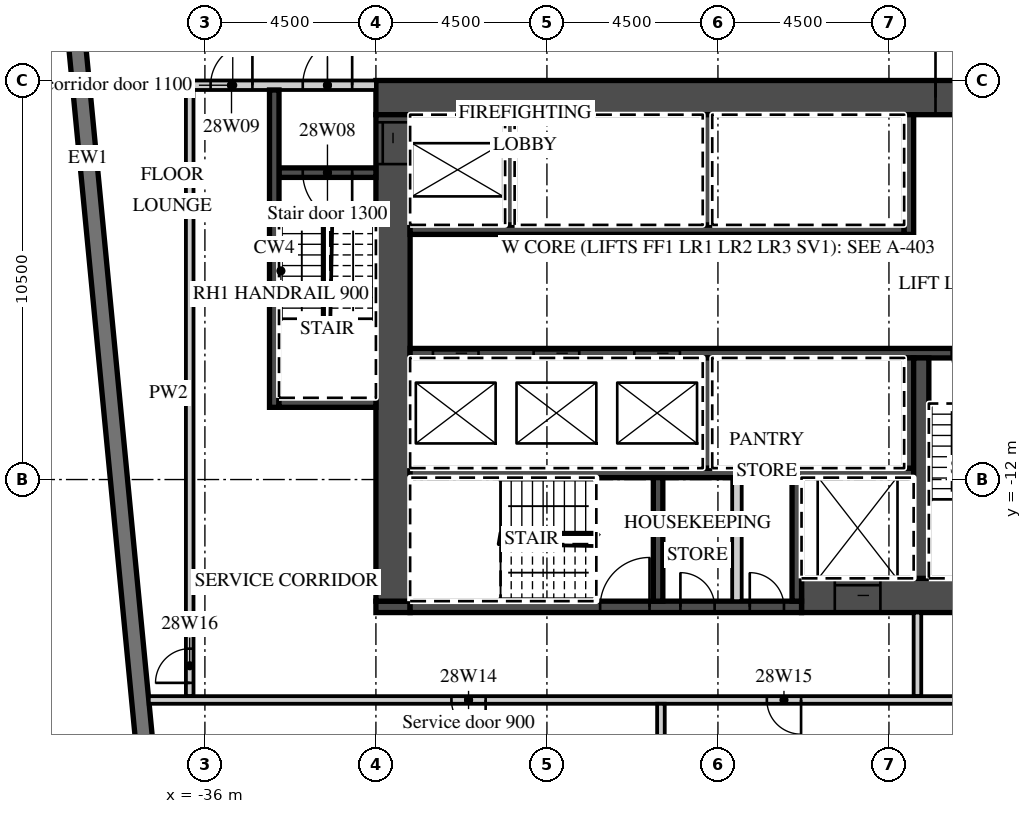
"""IFC4 building model, lengths in metres.
Left out: names, types, materials, properties, quantities, classifications, styles, units other than length and angle.
Written with IfcOpenShell. Run it as: python <this file> out.ifc"""

import sys

from ifc_helpers import new_model, si_unit, direction, frame, frame_2d, origin, place, context, subcontext, project, spatial, rectangle, extrude, element, fill, save


model = new_model("IFC4")
c1 = context("Model", 3, precision=1e-05, world=origin(), true_north=direction((0.0, 1.0)))
c2 = subcontext(c1, "Body", "Model", "MODEL_VIEW")
j1 = project(units=[si_unit("LENGTHUNIT", "METRE"), si_unit("PLANEANGLEUNIT", "RADIAN")], contexts=[c1])
p1 = place(None, origin())
s1 = spatial("IfcSite", under=j1, at=p1, CompositionType="ELEMENT")
p2 = place(p1, origin())
s2 = spatial("IfcBuilding", under=s1, at=p2, CompositionType="ELEMENT")
p3 = place(p2, frame((0.0, 0.0, 127.3)))
s3 = spatial("IfcBuildingStorey", under=s2, at=p3, CompositionType="ELEMENT", Elevation=127.3)
p4 = place(p3, frame((-40.753, 13.872, 0.0), z_axis=(0.0, 0.0, 1.0), x_axis=(0.095843327381, -0.995396431878, 0.0)))
e1 = element("IfcWall", 1, at=p4, inside=s3, PredefinedType="SOLIDWALL", context=c2, shape_type="SweptSolid", body=[
    extrude(rectangle(XDim=35.0, YDim=0.45, at=frame_2d((17.5, 0.0))), origin(), (0.0, 0.0, 1.0), 3.02),
])
p5 = place(p4, frame((4.277, 0.0, 0.45)))
e2 = element("IfcOpeningElement", 2, at=p5, cuts=e1, PredefinedType="OPENING", context=c2, shape_type="SweptSolid", body=[
    extrude(rectangle(XDim=3.3, YDim=2.25, at=frame_2d((1.65, 1.125))), frame((0.0, 0.235, 0.0), z_axis=(0.0, -1.0, 0.0), x_axis=(1.0, 0.0, 0.0)), (0.0, 0.0, 1.0), 0.47),
])
p6 = place(p4, frame((8.798, 0.0, 0.45)))
e3 = element("IfcOpeningElement", 3, at=p6, cuts=e1, PredefinedType="OPENING", context=c2, shape_type="SweptSolid", body=[
    extrude(rectangle(XDim=3.3, YDim=2.25, at=frame_2d((1.65, 1.125))), frame((0.0, 0.235, 0.0), z_axis=(0.0, -1.0, 0.0), x_axis=(1.0, 0.0, 0.0)), (0.0, 0.0, 1.0), 0.47),
])
p7 = place(p3, frame((-31.5, -1.95, 0.0), z_axis=(0.0, 0.0, 1.0), x_axis=(1.0, 0.0, 0.0)))
e4 = element("IfcWall", 4, at=p7, inside=s3, PredefinedType="SHEAR", context=c2, shape_type="SweptSolid", body=[
    extrude(rectangle(XDim=18.0, YDim=0.9, at=frame_2d((9.0, 0.0))), origin(), (0.0, 0.0, 1.0), 3.02),
])
p8 = place(p7, frame((14.725, 0.0, 0.0)))
e5 = element("IfcOpeningElement", 5, at=p8, cuts=e4, PredefinedType="OPENING", context=c2, shape_type="SweptSolid", body=[
    extrude(rectangle(XDim=1.8, YDim=2.1, at=frame_2d((0.9, 1.05))), frame((0.0, 0.46, 0.0), z_axis=(0.0, -1.0, 0.0), x_axis=(1.0, 0.0, 0.0)), (0.0, 0.0, 1.0), 0.92),
])
p9 = place(p3, frame((-20.3, -15.05, 0.0), z_axis=(0.0, 0.0, 1.0), x_axis=(1.0, 0.0, 0.0)))
e6 = element("IfcWall", 6, at=p9, inside=s3, PredefinedType="SHEAR", context=c2, shape_type="SweptSolid", body=[
    extrude(rectangle(XDim=6.8, YDim=0.9, at=frame_2d((3.4, 0.0))), origin(), (0.0, 0.0, 1.0), 3.02),
])
p10 = place(p9, frame((0.875, 0.0, 0.0)))
e7 = element("IfcOpeningElement", 7, at=p10, cuts=e6, PredefinedType="OPENING", context=c2, shape_type="SweptSolid", body=[
    extrude(rectangle(XDim=1.2, YDim=2.1, at=frame_2d((0.6, 1.05))), frame((0.0, 0.46, 0.0), z_axis=(0.0, -1.0, 0.0), x_axis=(1.0, 0.0, 0.0)), (0.0, 0.0, 1.0), 0.92),
])
p11 = place(p3, frame((-31.5, -15.35, 0.0), z_axis=(0.0, 0.0, 1.0), x_axis=(1.0, 0.0, 0.0)))
e8 = element("IfcWall", 8, at=p11, inside=s3, PredefinedType="SHEAR", context=c2, shape_type="SweptSolid", body=[
    extrude(rectangle(XDim=0.9, YDim=0.3, at=frame_2d((0.45, 0.0))), origin(), (0.0, 0.0, 1.0), 3.02),
])
p12 = place(p3, frame((-30.6, -15.35, 0.0), z_axis=(0.0, 0.0, 1.0), x_axis=(1.0, 0.0, 0.0)))
e9 = element("IfcWall", 9, at=p12, inside=s3, PredefinedType="SHEAR", context=c2, shape_type="SweptSolid", body=[
    extrude(rectangle(XDim=10.3, YDim=0.3, at=frame_2d((5.15, 0.0))), origin(), (0.0, 0.0, 1.0), 3.02),
])
p13 = place(p12, frame((5.0, 0.0, 0.0)))
e10 = element("IfcOpeningElement", 10, at=p13, cuts=e9, PredefinedType="OPENING", context=c2, shape_type="SweptSolid", body=[
    extrude(rectangle(XDim=1.3, YDim=2.1, at=frame_2d((0.65, 1.05))), frame((0.0, 0.16, 0.0), z_axis=(0.0, -1.0, 0.0), x_axis=(1.0, 0.0, 0.0)), (0.0, 0.0, 1.0), 0.32),
])
p14 = place(p12, frame((7.113, 0.0, 0.0)))
e11 = element("IfcOpeningElement", 11, at=p14, cuts=e9, PredefinedType="OPENING", context=c2, shape_type="SweptSolid", body=[
    extrude(rectangle(XDim=0.9, YDim=2.1, at=frame_2d((0.45, 1.05))), frame((0.0, 0.16, 0.0), z_axis=(0.0, -1.0, 0.0), x_axis=(1.0, 0.0, 0.0)), (0.0, 0.0, 1.0), 0.32),
])
p15 = place(p12, frame((8.938, 0.0, 0.0)))
e12 = element("IfcOpeningElement", 12, at=p15, cuts=e9, PredefinedType="OPENING", context=c2, shape_type="SweptSolid", body=[
    extrude(rectangle(XDim=0.9, YDim=2.1, at=frame_2d((0.45, 1.05))), frame((0.0, 0.16, 0.0), z_axis=(0.0, -1.0, 0.0), x_axis=(1.0, 0.0, 0.0)), (0.0, 0.0, 1.0), 0.32),
])
p16 = place(p3, frame((-31.05, -15.2, 0.0), z_axis=(0.0, 0.0, 1.0), x_axis=(0.0, 1.0, 0.0)))
e13 = element("IfcWall", 13, at=p16, inside=s3, PredefinedType="SHEAR", context=c2, shape_type="SweptSolid", body=[
    extrude(rectangle(XDim=12.8, YDim=0.9, at=frame_2d((6.4, 0.0))), origin(), (0.0, 0.0, 1.0), 3.02),
])
p17 = place(p16, frame((11.5, 0.0, 0.0)))
e14 = element("IfcOpeningElement", 14, at=p17, cuts=e13, PredefinedType="OPENING", context=c2, shape_type="SweptSolid", body=[
    extrude(rectangle(XDim=1.1, YDim=2.1, at=frame_2d((0.55, 1.05))), frame((0.0, 0.46, 0.0), z_axis=(0.0, -1.0, 0.0), x_axis=(1.0, 0.0, 0.0)), (0.0, 0.0, 1.0), 0.92),
])
p18 = place(p3, frame((-30.6, -5.425, 0.0), z_axis=(0.0, 0.0, 1.0), x_axis=(1.0, 0.0, 0.0)))
e15 = element("IfcWall", 15, at=p18, inside=s3, PredefinedType="SHEAR", context=c2, shape_type="SweptSolid", body=[
    extrude(rectangle(XDim=13.0, YDim=0.25, at=frame_2d((6.5, 0.0))), origin(), (0.0, 0.0, 1.0), 3.02),
])
p19 = place(p3, frame((-17.475, -5.55, 0.0), z_axis=(0.0, 0.0, 1.0), x_axis=(0.0, 1.0, 0.0)))
e16 = element("IfcWall", 16, at=p19, inside=s3, PredefinedType="SHEAR", context=c2, shape_type="SweptSolid", body=[
    extrude(rectangle(XDim=3.15, YDim=0.25, at=frame_2d((1.575, 0.0))), origin(), (0.0, 0.0, 1.0), 3.02),
])
for number, where, z_axis, x_axis in (
    (17, (-27.975, -5.3, 0.0), (0.0, 0.0, 1.0), (0.0, 1.0, 0.0)),
    (18, (-22.775, -5.3, 0.0), (0.0, 0.0, 1.0), (0.0, 1.0, 0.0)),
):
    element("IfcWall", number, at=place(p3, frame(where, z_axis=z_axis, x_axis=x_axis)), inside=s3, PredefinedType="SHEAR", context=c2, shape_type="SweptSolid", body=[
        extrude(rectangle(XDim=2.9, YDim=0.25, at=frame_2d((1.45, 0.0))), origin(), (0.0, 0.0, 1.0), 3.02),
    ])
p20 = place(p3, frame((-30.6, -8.675, 0.0), z_axis=(0.0, 0.0, 1.0), x_axis=(1.0, 0.0, 0.0)))
e19 = element("IfcWall", 19, at=p20, inside=s3, PredefinedType="SHEAR", context=c2, shape_type="SweptSolid", body=[
    extrude(rectangle(XDim=16.2, YDim=0.25, at=frame_2d((8.1, 0.0))), origin(), (0.0, 0.0, 1.0), 3.02),
])
p21 = place(p20, frame((0.6, 0.0, 0.0)))
e20 = element("IfcOpeningElement", 20, at=p21, cuts=e19, PredefinedType="OPENING", context=c2, shape_type="SweptSolid", body=[
    extrude(rectangle(XDim=1.2, YDim=2.1, at=frame_2d((0.6, 1.05))), frame((0.0, 0.135, 0.0), z_axis=(0.0, -1.0, 0.0), x_axis=(1.0, 0.0, 0.0)), (0.0, 0.0, 1.0), 0.27),
])
p22 = place(p20, frame((3.25, 0.0, 0.0)))
e21 = element("IfcOpeningElement", 21, at=p22, cuts=e19, PredefinedType="OPENING", context=c2, shape_type="SweptSolid", body=[
    extrude(rectangle(XDim=1.2, YDim=2.1, at=frame_2d((0.6, 1.05))), frame((0.0, 0.135, 0.0), z_axis=(0.0, -1.0, 0.0), x_axis=(1.0, 0.0, 0.0)), (0.0, 0.0, 1.0), 0.27),
])
p23 = place(p20, frame((5.9, 0.0, 0.0)))
e22 = element("IfcOpeningElement", 22, at=p23, cuts=e19, PredefinedType="OPENING", context=c2, shape_type="SweptSolid", body=[
    extrude(rectangle(XDim=1.2, YDim=2.1, at=frame_2d((0.6, 1.05))), frame((0.0, 0.135, 0.0), z_axis=(0.0, -1.0, 0.0), x_axis=(1.0, 0.0, 0.0)), (0.0, 0.0, 1.0), 0.27),
])
p24 = place(p20, frame((14.25, 0.0, 0.0)))
e23 = element("IfcOpeningElement", 23, at=p24, cuts=e19, PredefinedType="OPENING", context=c2, shape_type="SweptSolid", body=[
    extrude(rectangle(XDim=1.3, YDim=2.1, at=frame_2d((0.65, 1.05))), frame((0.0, 0.135, 0.0), z_axis=(0.0, -1.0, 0.0), x_axis=(1.0, 0.0, 0.0)), (0.0, 0.0, 1.0), 0.27),
])
p25 = place(p3, frame((-30.6, -11.825, 0.0), z_axis=(0.0, 0.0, 1.0), x_axis=(1.0, 0.0, 0.0)))
e24 = element("IfcWall", 24, at=p25, inside=s3, PredefinedType="SHEAR", context=c2, shape_type="SweptSolid", body=[
    extrude(rectangle(XDim=13.25, YDim=0.25, at=frame_2d((6.625, 0.0))), origin(), (0.0, 0.0, 1.0), 3.02),
])
for number, where, z_axis, x_axis in (
    (25, (-17.475, -11.7, 0.0), (0.0, 0.0, 1.0), (0.0, 1.0, 0.0)),
    (26, (-22.775, -11.7, 0.0), (0.0, 0.0, 1.0), (0.0, 1.0, 0.0)),
):
    element("IfcWall", number, at=place(p3, frame(where, z_axis=z_axis, x_axis=x_axis)), inside=s3, PredefinedType="SHEAR", context=c2, shape_type="SweptSolid", body=[
        extrude(rectangle(XDim=2.9, YDim=0.25, at=frame_2d((1.45, 0.0))), origin(), (0.0, 0.0, 1.0), 3.02),
    ])
p26 = place(p3, frame((-17.15, -14.6, 0.0), z_axis=(0.0, 0.0, 1.0), x_axis=(0.0, 1.0, 0.0)))
e27 = element("IfcWall", 27, at=p26, inside=s3, PredefinedType="SHEAR", context=c2, shape_type="SweptSolid", body=[
    extrude(rectangle(XDim=5.8, YDim=0.4, at=frame_2d((2.9, 0.0))), origin(), (0.0, 0.0, 1.0), 3.02),
])
for number, where, z_axis, x_axis in (
    (28, (-20.425, -15.2, 0.0), (0.0, 0.0, 1.0), (0.0, 1.0, 0.0)),
    (29, (-24.075, -15.2, 0.0), (0.0, 0.0, 1.0), (0.0, 1.0, 0.0)),
):
    element("IfcWall", number, at=place(p3, frame(where, z_axis=z_axis, x_axis=x_axis)), inside=s3, PredefinedType="SHEAR", context=c2, shape_type="SweptSolid", body=[
        extrude(rectangle(XDim=3.25, YDim=0.25, at=frame_2d((1.625, 0.0))), origin(), (0.0, 0.0, 1.0), 3.02),
    ])
p27 = place(p3, frame((-22.0, -15.2, 0.0), z_axis=(0.0, 0.0, 1.0), x_axis=(0.0, 1.0, 0.0)))
e30 = element("IfcWall", 30, at=p27, inside=s3, PredefinedType="PARTITIONING", context=c2, shape_type="SweptSolid", body=[
    extrude(rectangle(XDim=3.25, YDim=0.25, at=frame_2d((1.625, 0.0))), origin(), (0.0, 0.0, 1.0), 3.02),
])
p28 = place(p3, frame((-39.035, -1.625, 0.0), z_axis=(0.0, 0.0, 1.0), x_axis=(1.0, 0.0, 0.0)))
e31 = element("IfcWall", 31, at=p28, inside=s3, PredefinedType="PARTITIONING", context=c2, shape_type="SweptSolid", body=[
    extrude(rectangle(XDim=7.535, YDim=0.25, at=frame_2d((3.768, 0.0))), origin(), (0.0, 0.0, 1.0), 3.02),
])
p29 = place(p28, frame((5.61, 0.0, 0.0)))
e32 = element("IfcOpeningElement", 32, at=p29, cuts=e31, PredefinedType="OPENING", context=c2, shape_type="SweptSolid", body=[
    extrude(rectangle(XDim=1.3, YDim=2.1, at=frame_2d((0.65, 1.05))), frame((0.0, 0.135, 0.0), z_axis=(0.0, -1.0, 0.0), x_axis=(1.0, 0.0, 0.0)), (0.0, 0.0, 1.0), 0.27),
])
p30 = place(p28, frame((3.185, 0.0, 0.0)))
e33 = element("IfcOpeningElement", 33, at=p30, cuts=e31, PredefinedType="OPENING", context=c2, shape_type="SweptSolid", body=[
    extrude(rectangle(XDim=1.1, YDim=2.1, at=frame_2d((0.55, 1.05))), frame((0.0, 0.135, 0.0), z_axis=(0.0, -1.0, 0.0), x_axis=(1.0, 0.0, 0.0)), (0.0, 0.0, 1.0), 0.27),
])
p31 = place(p3, frame((-34.05, -3.925, 0.0), z_axis=(0.0, 0.0, 1.0), x_axis=(1.0, 0.0, 0.0)))
e34 = element("IfcWall", 34, at=p31, inside=s3, PredefinedType="SHEAR", context=c2, shape_type="SweptSolid", body=[
    extrude(rectangle(XDim=2.55, YDim=0.25, at=frame_2d((1.275, 0.0))), origin(), (0.0, 0.0, 1.0), 3.02),
])
p32 = place(p31, frame((0.625, 0.0, 0.0)))
e35 = element("IfcOpeningElement", 35, at=p32, cuts=e34, PredefinedType="OPENING", context=c2, shape_type="SweptSolid", body=[
    extrude(rectangle(XDim=1.3, YDim=2.1, at=frame_2d((0.65, 1.05))), frame((0.0, 0.135, 0.0), z_axis=(0.0, -1.0, 0.0), x_axis=(1.0, 0.0, 0.0)), (0.0, 0.0, 1.0), 0.27),
])
p33 = place(p3, frame((-34.175, -10.1, 0.0), z_axis=(0.0, 0.0, 1.0), x_axis=(0.0, 1.0, 0.0)))
e36 = element("IfcWall", 36, at=p33, inside=s3, PredefinedType="SHEAR", context=c2, shape_type="SweptSolid", body=[
    extrude(rectangle(XDim=8.35, YDim=0.25, at=frame_2d((4.175, 0.0))), origin(), (0.0, 0.0, 1.0), 3.02),
])
p34 = place(p3, frame((-34.05, -9.975, 0.0), z_axis=(0.0, 0.0, 1.0), x_axis=(1.0, 0.0, 0.0)))
e37 = element("IfcWall", 37, at=p34, inside=s3, PredefinedType="SHEAR", context=c2, shape_type="SweptSolid", body=[
    extrude(rectangle(XDim=2.55, YDim=0.25, at=frame_2d((1.275, 0.0))), origin(), (0.0, 0.0, 1.0), 3.02),
])
p35 = place(p3, frame((-17.25, -17.7, 0.0), z_axis=(0.0, 0.0, 1.0), x_axis=(0.0, 1.0, 0.0)))
e38 = element("IfcWall", 38, at=p35, inside=s3, PredefinedType="PARTITIONING", context=c2, shape_type="SweptSolid", body=[
    extrude(rectangle(XDim=2.2, YDim=0.2, at=frame_2d((1.1, 0.0))), origin(), (0.0, 0.0, 1.0), 3.02),
])
p36 = place(p3, frame((-36.4, -17.7, 0.0), z_axis=(0.0, 0.0, 1.0), x_axis=(0.0, 1.0, 0.0)))
e39 = element("IfcWall", 39, at=p36, inside=s3, PredefinedType="PARTITIONING", context=c2, shape_type="SweptSolid", body=[
    extrude(rectangle(XDim=15.95, YDim=0.2, at=frame_2d((7.975, 0.0))), origin(), (0.0, 0.0, 1.0), 3.02),
])
p37 = place(p36, frame((0.35, 0.0, 0.0)))
e40 = element("IfcOpeningElement", 40, at=p37, cuts=e39, PredefinedType="OPENING", context=c2, shape_type="SweptSolid", body=[
    extrude(rectangle(XDim=0.9, YDim=2.1, at=frame_2d((0.45, 1.05))), frame((0.0, 0.11, 0.0), z_axis=(0.0, -1.0, 0.0), x_axis=(1.0, 0.0, 0.0)), (0.0, 0.0, 1.0), 0.22),
])
p38 = place(p3, frame((-37.477, -17.8, 0.0), z_axis=(0.0, 0.0, 1.0), x_axis=(1.0, 0.0, 0.0)))
e41 = element("IfcWall", 41, at=p38, inside=s3, PredefinedType="PARTITIONING", context=c2, shape_type="SweptSolid", body=[
    extrude(rectangle(XDim=23.877, YDim=0.2, at=frame_2d((11.938, 0.0))), origin(), (0.0, 0.0, 1.0), 3.02),
])
p39 = place(p38, frame((7.965, 0.0, 0.0)))
e42 = element("IfcOpeningElement", 42, at=p39, cuts=e41, PredefinedType="OPENING", context=c2, shape_type="SweptSolid", body=[
    extrude(rectangle(XDim=0.9, YDim=2.1, at=frame_2d((0.45, 1.05))), frame((0.0, 0.11, 0.0), z_axis=(0.0, -1.0, 0.0), x_axis=(1.0, 0.0, 0.0)), (0.0, 0.0, 1.0), 0.22),
])
p40 = place(p38, frame((16.265, 0.0, 0.0)))
e43 = element("IfcOpeningElement", 43, at=p40, cuts=e41, PredefinedType="OPENING", context=c2, shape_type="SweptSolid", body=[
    extrude(rectangle(XDim=0.9, YDim=2.1, at=frame_2d((0.45, 1.05))), frame((0.0, 0.11, 0.0), z_axis=(0.0, -1.0, 0.0), x_axis=(1.0, 0.0, 0.0)), (0.0, 0.0, 1.0), 0.22),
])
p41 = place(p3, frame((-24.0, -23.244, 0.0), z_axis=(0.0, 0.0, 1.0), x_axis=(0.0, 1.0, 0.0)))
e44 = element("IfcWall", 44, at=p41, inside=s3, PredefinedType="PARTITIONING", context=c2, shape_type="SweptSolid", body=[
    extrude(rectangle(XDim=5.344, YDim=0.2, at=frame_2d((2.672, 0.0))), origin(), (0.0, 0.0, 1.0), 3.02),
])
p42 = place(p21, origin())
e45 = element("IfcDoor", 45, at=p42, inside=s3, OperationType="SLIDING_TO_LEFT", PredefinedType="DOOR", context=c2, shape_type="SweptSolid", body=[
    extrude(rectangle(XDim=1.2, YDim=2.1, at=frame_2d((0.6, 1.05))), frame((0.0, 0.025, 0.0), z_axis=(0.0, -1.0, 0.0), x_axis=(1.0, 0.0, 0.0)), (0.0, 0.0, 1.0), 0.05),
])
fill(e20, e45)
p43 = place(p22, origin())
e46 = element("IfcDoor", 46, at=p43, inside=s3, OperationType="SLIDING_TO_RIGHT", PredefinedType="DOOR", context=c2, shape_type="SweptSolid", body=[
    extrude(rectangle(XDim=1.2, YDim=2.1, at=frame_2d((0.6, 1.05))), frame((0.0, 0.025, 0.0), z_axis=(0.0, -1.0, 0.0), x_axis=(1.0, 0.0, 0.0)), (0.0, 0.0, 1.0), 0.05),
])
fill(e21, e46)
p44 = place(p23, origin())
e47 = element("IfcDoor", 47, at=p44, inside=s3, OperationType="SLIDING_TO_RIGHT", PredefinedType="DOOR", context=c2, shape_type="SweptSolid", body=[
    extrude(rectangle(XDim=1.2, YDim=2.1, at=frame_2d((0.6, 1.05))), frame((0.0, 0.025, 0.0), z_axis=(0.0, -1.0, 0.0), x_axis=(1.0, 0.0, 0.0)), (0.0, 0.0, 1.0), 0.05),
])
fill(e22, e47)
p45 = place(p10, origin())
e48 = element("IfcDoor", 48, at=p45, inside=s3, OperationType="SLIDING_TO_LEFT", PredefinedType="DOOR", context=c2, shape_type="SweptSolid", body=[
    extrude(rectangle(XDim=1.2, YDim=2.1, at=frame_2d((0.6, 1.05))), frame((0.0, 0.025, 0.0), z_axis=(0.0, -1.0, 0.0), x_axis=(1.0, 0.0, 0.0)), (0.0, 0.0, 1.0), 0.05),
])
fill(e7, e48)
p46 = place(p17, origin())
e49 = element("IfcDoor", 49, at=p46, inside=s3, OperationType="SLIDING_TO_RIGHT", PredefinedType="DOOR", context=c2, shape_type="SweptSolid", body=[
    extrude(rectangle(XDim=1.1, YDim=2.1, at=frame_2d((0.55, 1.05))), frame((0.0, 0.025, 0.0), z_axis=(0.0, -1.0, 0.0), x_axis=(1.0, 0.0, 0.0)), (0.0, 0.0, 1.0), 0.05),
])
fill(e14, e49)
p47 = place(p8, origin())
e50 = element("IfcDoor", 50, at=p47, inside=s3, OperationType="DOUBLE_DOOR_DOUBLE_SWING", PredefinedType="DOOR", context=c2, shape_type="SweptSolid", body=[
    extrude(rectangle(XDim=1.8, YDim=2.1, at=frame_2d((0.9, 1.05))), frame((0.0, 0.025, 0.0), z_axis=(0.0, -1.0, 0.0), x_axis=(1.0, 0.0, 0.0)), (0.0, 0.0, 1.0), 0.05),
])
fill(e5, e50)
p48 = place(p29, origin())
e51 = element("IfcDoor", 51, at=p48, inside=s3, OperationType="SINGLE_SWING_RIGHT", PredefinedType="DOOR", context=c2, shape_type="SweptSolid", body=[
    extrude(rectangle(XDim=1.3, YDim=2.1, at=frame_2d((0.65, 1.05))), frame((0.0, 0.025, 0.0), z_axis=(0.0, -1.0, 0.0), x_axis=(1.0, 0.0, 0.0)), (0.0, 0.0, 1.0), 0.05),
])
fill(e32, e51)
p49 = place(p32, origin())
e52 = element("IfcDoor", 52, at=p49, inside=s3, OperationType="SINGLE_SWING_RIGHT", PredefinedType="DOOR", context=c2, shape_type="SweptSolid", body=[
    extrude(rectangle(XDim=1.3, YDim=2.1, at=frame_2d((0.65, 1.05))), frame((0.0, 0.025, 0.0), z_axis=(0.0, -1.0, 0.0), x_axis=(1.0, 0.0, 0.0)), (0.0, 0.0, 1.0), 0.05),
])
fill(e35, e52)
p50 = place(p30, origin())
e53 = element("IfcDoor", 53, at=p50, inside=s3, OperationType="SINGLE_SWING_RIGHT", PredefinedType="DOOR", context=c2, shape_type="SweptSolid", body=[
    extrude(rectangle(XDim=1.1, YDim=2.1, at=frame_2d((0.55, 1.05))), frame((0.0, 0.025, 0.0), z_axis=(0.0, -1.0, 0.0), x_axis=(1.0, 0.0, 0.0)), (0.0, 0.0, 1.0), 0.05),
])
fill(e33, e53)
p51 = place(p24, origin())
e54 = element("IfcDoor", 54, at=p51, inside=s3, OperationType="SINGLE_SWING_RIGHT", PredefinedType="DOOR", context=c2, shape_type="SweptSolid", body=[
    extrude(rectangle(XDim=1.3, YDim=2.1, at=frame_2d((0.65, 1.05))), frame((0.0, 0.025, 0.0), z_axis=(0.0, -1.0, 0.0), x_axis=(1.0, 0.0, 0.0)), (0.0, 0.0, 1.0), 0.05),
])
fill(e23, e54)
p52 = place(p13, origin())
e55 = element("IfcDoor", 55, at=p52, inside=s3, OperationType="SINGLE_SWING_RIGHT", PredefinedType="DOOR", context=c2, shape_type="SweptSolid", body=[
    extrude(rectangle(XDim=1.3, YDim=2.1, at=frame_2d((0.65, 1.05))), frame((0.0, 0.025, 0.0), z_axis=(0.0, -1.0, 0.0), x_axis=(1.0, 0.0, 0.0)), (0.0, 0.0, 1.0), 0.05),
])
fill(e10, e55)
p53 = place(p14, origin())
e56 = element("IfcDoor", 56, at=p53, inside=s3, OperationType="SINGLE_SWING_LEFT", PredefinedType="DOOR", context=c2, shape_type="SweptSolid", body=[
    extrude(rectangle(XDim=0.9, YDim=2.1, at=frame_2d((0.45, 1.05))), frame((0.0, 0.025, 0.0), z_axis=(0.0, -1.0, 0.0), x_axis=(1.0, 0.0, 0.0)), (0.0, 0.0, 1.0), 0.05),
])
fill(e11, e56)
p54 = place(p15, origin())
e57 = element("IfcDoor", 57, at=p54, inside=s3, OperationType="SINGLE_SWING_LEFT", PredefinedType="DOOR", context=c2, shape_type="SweptSolid", body=[
    extrude(rectangle(XDim=0.9, YDim=2.1, at=frame_2d((0.45, 1.05))), frame((0.0, 0.025, 0.0), z_axis=(0.0, -1.0, 0.0), x_axis=(1.0, 0.0, 0.0)), (0.0, 0.0, 1.0), 0.05),
])
fill(e12, e57)
p55 = place(p39, origin())
e58 = element("IfcDoor", 58, at=p55, inside=s3, OperationType="SINGLE_SWING_RIGHT", PredefinedType="DOOR", context=c2, shape_type="SweptSolid", body=[
    extrude(rectangle(XDim=0.9, YDim=2.1, at=frame_2d((0.45, 1.05))), frame((0.0, 0.025, 0.0), z_axis=(0.0, -1.0, 0.0), x_axis=(1.0, 0.0, 0.0)), (0.0, 0.0, 1.0), 0.05),
])
fill(e42, e58)
p56 = place(p40, origin())
e59 = element("IfcDoor", 59, at=p56, inside=s3, OperationType="SINGLE_SWING_RIGHT", PredefinedType="DOOR", context=c2, shape_type="SweptSolid", body=[
    extrude(rectangle(XDim=0.9, YDim=2.1, at=frame_2d((0.45, 1.05))), frame((0.0, 0.025, 0.0), z_axis=(0.0, -1.0, 0.0), x_axis=(1.0, 0.0, 0.0)), (0.0, 0.0, 1.0), 0.05),
])
fill(e43, e59)
p57 = place(p37, origin())
e60 = element("IfcDoor", 60, at=p57, inside=s3, OperationType="SINGLE_SWING_LEFT", PredefinedType="DOOR", context=c2, shape_type="SweptSolid", body=[
    extrude(rectangle(XDim=0.9, YDim=2.1, at=frame_2d((0.45, 1.05))), frame((0.0, 0.025, 0.0), z_axis=(0.0, -1.0, 0.0), x_axis=(1.0, 0.0, 0.0)), (0.0, 0.0, 1.0), 0.05),
])
fill(e40, e60)
save(model, sys.argv[1])
